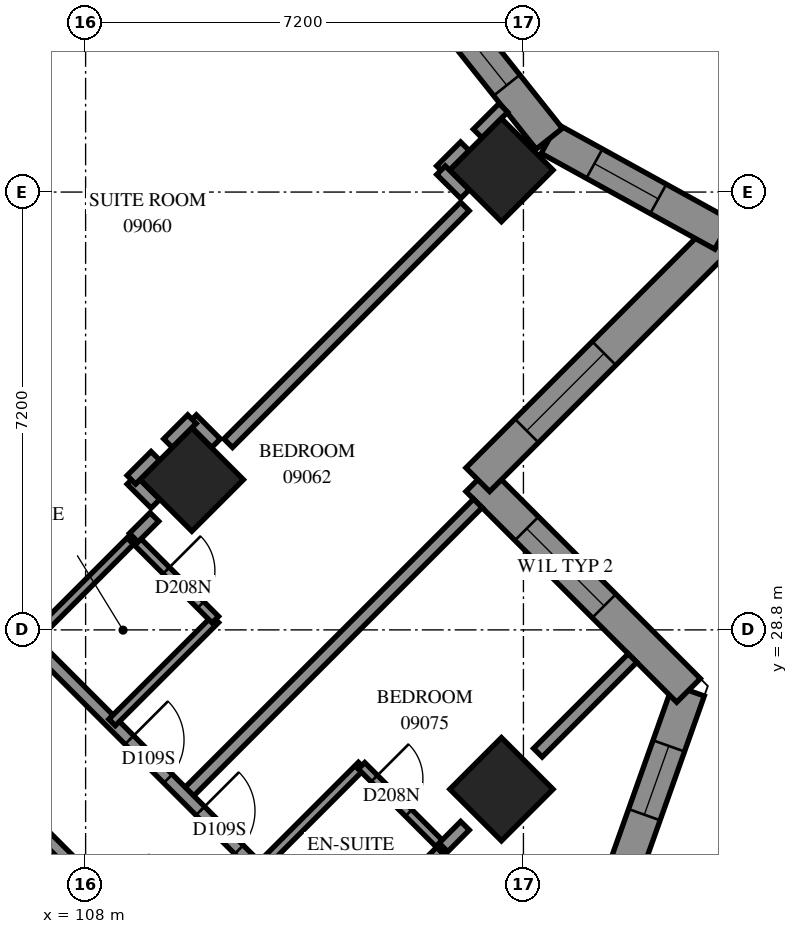
"""IFC4 building model, lengths in metres.
Left out: names, types, materials, properties, quantities, classifications, styles, units other than length and angle.
Written with IfcOpenShell. Run it as: python <this file> out.ifc"""

import sys

from ifc_helpers import new_model, si_unit, direction, frame, frame_2d, origin, origin_2d, place, context, subcontext, project, spatial, polyline, rectangle, outline, extrude, element, fill, save


model = new_model("IFC4")
c1 = context("Model", 3, precision=1e-05, world=origin(), true_north=direction((0.0, 1.0)))
c2 = subcontext(c1, "Body", "Model", "MODEL_VIEW")
j1 = project(units=[si_unit("LENGTHUNIT", "METRE"), si_unit("PLANEANGLEUNIT", "RADIAN")], contexts=[c1])
p1 = place(None, origin())
s1 = spatial("IfcSite", under=j1, at=p1, CompositionType="ELEMENT")
p2 = place(p1, origin())
s2 = spatial("IfcBuilding", under=s1, at=p2, CompositionType="ELEMENT")
p3 = place(p2, frame((0.0, 0.0, 37.2)))
s3 = spatial("IfcBuildingStorey", under=s2, at=p3, CompositionType="ELEMENT", Elevation=37.2)
for number, where, z_axis, x_axis in (
    (1, (114.838, 36.362, 0.0), (0.0, 0.0, 1.0), (0.707, -0.707, 0.0)),
    (2, (109.747, 31.271, 0.0), (0.0, 0.0, 1.0), (0.707, -0.707, 0.0)),
    (3, (114.838, 26.18, 0.0), (0.0, 0.0, 1.0), (0.707, -0.707, 0.0)),
):
    element("IfcColumn", number, at=place(p3, frame(where, z_axis=z_axis, x_axis=x_axis)), inside=s3, PredefinedType="COLUMN", context=c2, shape_type="SweptSolid", body=[
        extrude(rectangle(XDim=1.2, YDim=1.2, at=origin_2d()), origin(), (0.0, 0.0, 1.0), 3.1),
    ])
p4 = place(p3, frame((116.143, 22.82, 0.0), z_axis=(0.0, 0.0, 1.0), x_axis=(0.334975732, 0.9422267556, 0.0)))
e4 = element("IfcWall", 4, at=p4, inside=s3, PredefinedType="SOLIDWALL", context=c2, shape_type="SweptSolid", body=[
    extrude(outline(polyline([(-0.125, -0.275), (5.464, -0.275), (5.117, 0.275), (0.125, 0.275), (-0.125, -0.275)])), origin(), (0.0, 0.0, 1.0), 3.1),
])
p5 = place(p4, frame((0.825, 0.0, 0.5)))
e5 = element("IfcOpeningElement", 5, at=p5, cuts=e4, PredefinedType="OPENING", context=c2, shape_type="SweptSolid", body=[
    extrude(rectangle(XDim=1.2, YDim=2.45, at=frame_2d((0.6, 1.225))), frame((0.0, 0.285, 0.0), z_axis=(0.0, -1.0, 0.0), x_axis=(1.0, 0.0, 0.0)), (0.0, 0.0, 1.0), 0.57),
])
p6 = place(p4, frame((3.121, 0.0, 0.5)))
e6 = element("IfcOpeningElement", 6, at=p6, cuts=e4, PredefinedType="OPENING", context=c2, shape_type="SweptSolid", body=[
    extrude(rectangle(XDim=1.2, YDim=2.45, at=frame_2d((0.6, 1.225))), frame((0.0, 0.285, 0.0), z_axis=(0.0, -1.0, 0.0), x_axis=(1.0, 0.0, 0.0)), (0.0, 0.0, 1.0), 0.57),
])
p7 = place(p3, frame((117.915, 27.805, 0.0), z_axis=(0.0, 0.0, 1.0), x_axis=(-0.7071067812, 0.7071067812, 0.0)))
e7 = element("IfcWall", 7, at=p7, inside=s3, PredefinedType="SOLIDWALL", context=c2, shape_type="SweptSolid", body=[
    extrude(outline(polyline([(-0.174, -0.275), (4.626, -0.275), (5.176, 0.275), (0.174, 0.275), (-0.174, -0.275)])), origin(), (0.0, 0.0, 1.0), 3.1),
])
p8 = place(p7, frame((1.964, 0.0, 0.6)))
e8 = element("IfcOpeningElement", 8, at=p8, cuts=e7, PredefinedType="OPENING", context=c2, shape_type="SweptSolid", body=[
    extrude(rectangle(XDim=1.8, YDim=1.9, at=frame_2d((0.9, 0.95))), frame((0.0, 0.285, 0.0), z_axis=(0.0, -1.0, 0.0), x_axis=(1.0, 0.0, 0.0)), (0.0, 0.0, 1.0), 0.57),
])
p9 = place(p3, frame((114.449, 31.271, 0.0), z_axis=(0.0, 0.0, 1.0), x_axis=(0.7070892384, 0.7071243236, 0.0)))
e9 = element("IfcWall", 9, at=p9, inside=s3, PredefinedType="SOLIDWALL", context=c2, shape_type="SweptSolid", body=[
    extrude(outline(polyline([(0.275, -0.275), (6.066, -0.275), (5.335, 0.275), (-0.275, 0.275), (0.275, -0.275)])), origin(), (0.0, 0.0, 1.0), 3.1),
])
p10 = place(p9, frame((1.137, 0.0, 0.6)))
e10 = element("IfcOpeningElement", 10, at=p10, cuts=e9, PredefinedType="OPENING", context=c2, shape_type="SweptSolid", body=[
    extrude(rectangle(XDim=1.8, YDim=1.9, at=frame_2d((0.9, 0.95))), frame((0.0, 0.285, 0.0), z_axis=(0.0, -1.0, 0.0), x_axis=(1.0, 0.0, 0.0)), (0.0, 0.0, 1.0), 0.57),
])
p11 = place(p3, frame((118.48, 35.301, 0.0), z_axis=(0.0, 0.0, 1.0), x_axis=(-0.8755307205, 0.4831624545, 0.0)))
e11 = element("IfcWall", 11, at=p11, inside=s3, PredefinedType="SOLIDWALL", context=c2, shape_type="SweptSolid", body=[
    extrude(outline(polyline([(-0.366, -0.275), (3.206, -0.275), (3.316, 0.275), (0.366, 0.275), (-0.366, -0.275)])), origin(), (0.0, 0.0, 1.0), 3.1),
])
p12 = place(p11, frame((1.214, 0.0, 0.5)))
e12 = element("IfcOpeningElement", 12, at=p12, cuts=e11, PredefinedType="OPENING", context=c2, shape_type="SweptSolid", body=[
    extrude(rectangle(XDim=1.2, YDim=2.45, at=frame_2d((0.6, 1.225))), frame((0.0, 0.285, 0.0), z_axis=(0.0, -1.0, 0.0), x_axis=(1.0, 0.0, 0.0)), (0.0, 0.0, 1.0), 0.57),
])
p13 = place(p3, frame((115.625, 36.877, 0.0), z_axis=(0.0, 0.0, 1.0), x_axis=(-0.6225043527, 0.782616337, 0.0)))
e13 = element("IfcWall", 13, at=p13, inside=s3, PredefinedType="SOLIDWALL", context=c2, shape_type="SweptSolid", body=[
    extrude(outline(polyline([(0.055, -0.275), (3.509, -0.275), (3.446, 0.275), (-0.055, 0.275), (0.055, -0.275)])), origin(), (0.0, 0.0, 1.0), 3.1),
])
p14 = place(p13, frame((1.123, 0.0, 0.5)))
e14 = element("IfcOpeningElement", 14, at=p14, cuts=e13, PredefinedType="OPENING", context=c2, shape_type="SweptSolid", body=[
    extrude(rectangle(XDim=1.2, YDim=2.45, at=frame_2d((0.6, 1.225))), frame((0.0, 0.285, 0.0), z_axis=(0.0, -1.0, 0.0), x_axis=(1.0, 0.0, 0.0)), (0.0, 0.0, 1.0), 0.57),
])
p15 = place(p3, frame((99.459, 36.255, 0.0), z_axis=(0.0, 0.0, 1.0), x_axis=(0.7071907307, 0.7070228217, 0.0)))
e15 = element("IfcWall", 15, at=p15, inside=s3, PredefinedType="PARTITIONING", context=c2, shape_type="SweptSolid", body=[
    extrude(rectangle(XDim=11.911, YDim=0.2, at=frame_2d((5.956, 0.0))), origin(), (0.0, 0.0, 1.0), 3.1),
])
p16 = place(p3, frame((103.061, 29.677, 0.0), z_axis=(0.0, 0.0, 1.0), x_axis=(0.7071067812, -0.7071067812, 0.0)))
e16 = element("IfcWall", 16, at=p16, inside=s3, PredefinedType="PARTITIONING", context=c2, shape_type="SweptSolid", body=[
    extrude(rectangle(XDim=10.802, YDim=0.2, at=frame_2d((5.401, 0.0))), origin(), (0.0, 0.0, 1.0), 3.1),
])
p17 = place(p16, frame((2.012, 0.0, 0.0)))
e17 = element("IfcOpeningElement", 17, at=p17, cuts=e16, PredefinedType="OPENING", context=c2, shape_type="SweptSolid", body=[
    extrude(rectangle(XDim=0.9, YDim=2.1, at=frame_2d((0.45, 1.05))), frame((0.0, 0.11, 0.0), z_axis=(0.0, -1.0, 0.0), x_axis=(1.0, 0.0, 0.0)), (0.0, 0.0, 1.0), 0.22),
])
p18 = place(p16, frame((7.463, 0.0, 0.0)))
e18 = element("IfcOpeningElement", 18, at=p18, cuts=e16, PredefinedType="OPENING", context=c2, shape_type="SweptSolid", body=[
    extrude(rectangle(XDim=1.0, YDim=2.1, at=frame_2d((0.5, 1.05))), frame((0.0, 0.11, 0.0), z_axis=(0.0, -1.0, 0.0), x_axis=(1.0, 0.0, 0.0)), (0.0, 0.0, 1.0), 0.22),
])
p19 = place(p3, frame((109.64, 26.074, 0.0), z_axis=(0.0, 0.0, 1.0), x_axis=(0.7072538194, 0.7069597124, 0.0)))
e19 = element("IfcWall", 19, at=p19, inside=s3, PredefinedType="PARTITIONING", context=c2, shape_type="SweptSolid", body=[
    extrude(rectangle(XDim=6.8, YDim=0.2, at=frame_2d((3.4, 0.0))), origin(), (0.0, 0.0, 1.0), 3.1),
])
for number, where, z_axis, x_axis in (
    (20, (110.345, 31.871, 0.0), (0.0, 0.0, 1.0), (0.707, 0.707, 0.0)),
    (21, (105.255, 36.963, 0.0), (0.0, 0.0, 1.0), (0.707, 0.707, 0.0)),
):
    element("IfcWall", number, at=place(p3, frame(where, z_axis=z_axis, x_axis=x_axis)), inside=s3, PredefinedType="PARTITIONING", context=c2, shape_type="SweptSolid", body=[
        extrude(rectangle(XDim=5.504, YDim=0.2, at=frame_2d((2.752, 0.0))), origin(), (0.0, 0.0, 1.0), 3.1),
    ])
p20 = place(p3, frame((107.093, 28.615, 0.0), z_axis=(0.0, 0.0, 1.0), x_axis=(0.7072011313, -0.7070124185, 0.0)))
e22 = element("IfcWall", 22, at=p20, inside=s3, PredefinedType="PARTITIONING", context=c2, shape_type="SweptSolid", body=[
    extrude(rectangle(XDim=5.299, YDim=0.2, at=frame_2d((2.65, 0.0))), origin(), (0.0, 0.0, 1.0), 3.1),
])
p21 = place(p20, frame((2.299, 0.0, 0.0)))
e23 = element("IfcOpeningElement", 23, at=p21, cuts=e22, PredefinedType="OPENING", context=c2, shape_type="SweptSolid", body=[
    extrude(rectangle(XDim=0.9, YDim=2.1, at=frame_2d((0.45, 1.05))), frame((0.0, 0.11, 0.0), z_axis=(0.0, -1.0, 0.0), x_axis=(1.0, 0.0, 0.0)), (0.0, 0.0, 1.0), 0.22),
])
p22 = place(p20, frame((3.949, 0.0, 0.0)))
e24 = element("IfcOpeningElement", 24, at=p22, cuts=e22, PredefinedType="OPENING", context=c2, shape_type="SweptSolid", body=[
    extrude(rectangle(XDim=0.9, YDim=2.1, at=frame_2d((0.45, 1.05))), frame((0.0, 0.11, 0.0), z_axis=(0.0, -1.0, 0.0), x_axis=(1.0, 0.0, 0.0)), (0.0, 0.0, 1.0), 0.22),
])
p23 = place(p3, frame((108.435, 27.279, 0.0), z_axis=(0.0, 0.0, 1.0), x_axis=(0.7075233388, 0.706689978, 0.0)))
e25 = element("IfcWall", 25, at=p23, inside=s3, PredefinedType="PARTITIONING", context=c2, shape_type="SweptSolid", body=[
    extrude(rectangle(XDim=2.4, YDim=0.15, at=frame_2d((1.2, 0.0))), origin(), (0.0, 0.0, 1.0), 3.1),
])
p24 = place(p3, frame((112.183, 23.531, 0.0), z_axis=(0.0, 0.0, 1.0), x_axis=(0.7075233388, 0.706689978, 0.0)))
e26 = element("IfcWall", 26, at=p24, inside=s3, PredefinedType="PARTITIONING", context=c2, shape_type="SweptSolid", body=[
    extrude(rectangle(XDim=2.4, YDim=0.15, at=frame_2d((1.2, 0.0))), origin(), (0.0, 0.0, 1.0), 2.6),
])
for number, where, z_axis, x_axis in (
    (27, (107.095, 28.621, 0.0), (0.0, 0.0, 1.0), (0.707, 0.707, 0.0)),
    (28, (110.843, 24.873, 0.0), (0.0, 0.0, 1.0), (0.707, 0.707, 0.0)),
):
    element("IfcWall", number, at=place(p3, frame(where, z_axis=z_axis, x_axis=x_axis)), inside=s3, PredefinedType="PARTITIONING", context=c2, shape_type="SweptSolid", body=[
        extrude(rectangle(XDim=2.398, YDim=0.15, at=frame_2d((1.199, 0.0))), origin(), (0.0, 0.0, 1.0), 3.1),
    ])
p25 = place(p3, frame((115.438, 26.78, 0.0), z_axis=(0.0, 0.0, 1.0), x_axis=(0.7071067812, 0.7071067812, 0.0)))
e29 = element("IfcWall", 29, at=p25, inside=s3, PredefinedType="PARTITIONING", context=c2, shape_type="SweptSolid", body=[
    extrude(rectangle(XDim=2.201, YDim=0.2, at=frame_2d((1.101, 0.0))), origin(), (0.0, 0.0, 1.0), 3.1),
])
p26 = place(p3, frame((108.789, 30.313, 0.0), z_axis=(0.0, 0.0, 1.0), x_axis=(0.7071067812, -0.7071067812, 0.0)))
e30 = element("IfcWall", 30, at=p26, inside=s3, PredefinedType="PARTITIONING", context=c2, shape_type="SweptSolid", body=[
    extrude(rectangle(XDim=1.901, YDim=0.15, at=frame_2d((0.95, 0.0))), origin(), (0.0, 0.0, 1.0), 3.1),
])
p27 = place(p26, frame((0.76, 0.0, 0.0)))
e31 = element("IfcOpeningElement", 31, at=p27, cuts=e30, PredefinedType="OPENING", context=c2, shape_type="SweptSolid", body=[
    extrude(rectangle(XDim=0.8, YDim=2.1, at=frame_2d((0.4, 1.05))), frame((0.0, 0.085, 0.0), z_axis=(0.0, -1.0, 0.0), x_axis=(1.0, 0.0, 0.0)), (0.0, 0.0, 1.0), 0.17),
])
p28 = place(p3, frame((112.537, 26.565, 0.0), z_axis=(0.0, 0.0, 1.0), x_axis=(0.7071067812, -0.7071067812, 0.0)))
e32 = element("IfcWall", 32, at=p28, inside=s3, PredefinedType="PARTITIONING", context=c2, shape_type="SweptSolid", body=[
    extrude(rectangle(XDim=1.901, YDim=0.15, at=frame_2d((0.95, 0.0))), origin(), (0.0, 0.0, 1.0), 3.1),
])
p29 = place(p28, frame((0.297, 0.0, 0.0)))
e33 = element("IfcOpeningElement", 33, at=p29, cuts=e32, PredefinedType="OPENING", context=c2, shape_type="SweptSolid", body=[
    extrude(rectangle(XDim=0.8, YDim=2.1, at=frame_2d((0.4, 1.05))), frame((0.0, 0.085, 0.0), z_axis=(0.0, -1.0, 0.0), x_axis=(1.0, 0.0, 0.0)), (0.0, 0.0, 1.0), 0.17),
])
for number, where, z_axis, x_axis in (
    (34, (113.843, 36.359, 0.0), (0.0, 0.0, 1.0), (0.707, 0.707, 0.0)),
    (35, (108.754, 31.268, 0.0), (0.0, 0.0, 1.0), (0.707, -0.707, 0.0)),
    (36, (109.751, 32.265, 0.0), (0.0, 0.0, 1.0), (0.707, -0.707, 0.0)),
    (37, (109.355, 31.871, 0.0), (0.0, 0.0, 1.0), (0.707, 0.707, 0.0)),
    (38, (108.753, 31.269, 0.0), (0.0, 0.0, 1.0), (0.707, 0.707, 0.0)),
):
    element("IfcWall", number, at=place(p3, frame(where, z_axis=z_axis, x_axis=x_axis)), inside=s3, PredefinedType="PARTITIONING", context=c2, shape_type="SweptSolid", body=[
        extrude(rectangle(XDim=0.557, YDim=0.2, at=frame_2d((0.279, 0.0))), origin(), (0.0, 0.0, 1.0), 3.1),
    ])
p30 = place(p3, frame((113.845, 36.359, 0.0), z_axis=(0.0, 0.0, 1.0), x_axis=(0.7089037401, -0.705305244, 0.0)))
e39 = element("IfcWall", 39, at=p30, inside=s3, PredefinedType="PARTITIONING", context=c2, shape_type="SweptSolid", body=[
    extrude(rectangle(XDim=0.556, YDim=0.2, at=frame_2d((0.278, 0.0))), origin(), (0.0, 0.0, 1.0), 3.1),
])
p31 = place(p3, frame((114.447, 36.963, 0.0), z_axis=(0.0, 0.0, 1.0), x_axis=(0.7071067812, 0.7071067812, 0.0)))
e40 = element("IfcWall", 40, at=p31, inside=s3, PredefinedType="PARTITIONING", context=c2, shape_type="SweptSolid", body=[
    extrude(rectangle(XDim=0.597, YDim=0.2, at=frame_2d((0.298, 0.0))), origin(), (0.0, 0.0, 1.0), 3.1),
])
p32 = place(p3, frame((113.885, 25.223, 0.0), z_axis=(0.0, 0.0, 1.0), x_axis=(0.7051121336, 0.709095818, 0.0)))
e41 = element("IfcWall", 41, at=p32, inside=s3, PredefinedType="PARTITIONING", context=c2, shape_type="SweptSolid", body=[
    extrude(rectangle(XDim=0.502, YDim=0.2, at=frame_2d((0.251, 0.0))), origin(), (0.0, 0.0, 1.0), 2.6),
])
p33 = place(p3, frame((108.791, 30.317, 0.0), z_axis=(0.0, 0.0, 1.0), x_axis=(0.7071067812, 0.7071067812, 0.0)))
e42 = element("IfcWall", 42, at=p33, inside=s3, PredefinedType="PARTITIONING", context=c2, shape_type="SweptSolid", body=[
    extrude(rectangle(XDim=0.481, YDim=0.2, at=frame_2d((0.24, 0.0))), origin(), (0.0, 0.0, 1.0), 3.1),
])
p34 = place(p6, origin())
e43 = element("IfcWindow", 43, at=p34, inside=s3, PartitioningType="SINGLE_PANEL", PredefinedType="WINDOW", context=c2, shape_type="SweptSolid", body=[
    extrude(rectangle(XDim=1.2, YDim=2.45, at=frame_2d((0.6, 1.225))), frame((0.0, 0.155, 0.0), z_axis=(0.0, -1.0, 0.0), x_axis=(1.0, 0.0, 0.0)), (0.0, 0.0, 1.0), 0.06),
])
fill(e6, e43)
p35 = place(p8, origin())
e44 = element("IfcWindow", 44, at=p35, inside=s3, PartitioningType="SINGLE_PANEL", PredefinedType="WINDOW", context=c2, shape_type="SweptSolid", body=[
    extrude(rectangle(XDim=1.8, YDim=1.9, at=frame_2d((0.9, 0.95))), frame((0.0, 0.155, 0.0), z_axis=(0.0, -1.0, 0.0), x_axis=(1.0, 0.0, 0.0)), (0.0, 0.0, 1.0), 0.06),
])
fill(e8, e44)
p36 = place(p10, origin())
e45 = element("IfcWindow", 45, at=p36, inside=s3, PartitioningType="SINGLE_PANEL", PredefinedType="WINDOW", context=c2, shape_type="SweptSolid", body=[
    extrude(rectangle(XDim=1.8, YDim=1.9, at=frame_2d((0.9, 0.95))), frame((0.0, 0.155, 0.0), z_axis=(0.0, -1.0, 0.0), x_axis=(1.0, 0.0, 0.0)), (0.0, 0.0, 1.0), 0.06),
])
fill(e10, e45)
p37 = place(p12, origin())
e46 = element("IfcWindow", 46, at=p37, inside=s3, PartitioningType="SINGLE_PANEL", PredefinedType="WINDOW", context=c2, shape_type="SweptSolid", body=[
    extrude(rectangle(XDim=1.2, YDim=2.45, at=frame_2d((0.6, 1.225))), frame((0.0, 0.155, 0.0), z_axis=(0.0, -1.0, 0.0), x_axis=(1.0, 0.0, 0.0)), (0.0, 0.0, 1.0), 0.06),
])
fill(e12, e46)
p38 = place(p14, origin())
e47 = element("IfcWindow", 47, at=p38, inside=s3, PartitioningType="SINGLE_PANEL", PredefinedType="WINDOW", context=c2, shape_type="SweptSolid", body=[
    extrude(rectangle(XDim=1.2, YDim=2.45, at=frame_2d((0.6, 1.225))), frame((0.0, 0.155, 0.0), z_axis=(0.0, -1.0, 0.0), x_axis=(1.0, 0.0, 0.0)), (0.0, 0.0, 1.0), 0.06),
])
fill(e14, e47)
p39 = place(p21, origin())
e48 = element("IfcDoor", 48, at=p39, inside=s3, OperationType="SINGLE_SWING_LEFT", PredefinedType="DOOR", context=c2, shape_type="SweptSolid", body=[
    extrude(rectangle(XDim=0.9, YDim=2.1, at=frame_2d((0.45, 1.05))), frame((0.0, 0.025, 0.0), z_axis=(0.0, -1.0, 0.0), x_axis=(1.0, 0.0, 0.0)), (0.0, 0.0, 1.0), 0.05),
])
fill(e23, e48)
p40 = place(p27, origin())
e49 = element("IfcDoor", 49, at=p40, inside=s3, OperationType="SINGLE_SWING_RIGHT", PredefinedType="DOOR", context=c2, shape_type="SweptSolid", body=[
    extrude(rectangle(XDim=0.8, YDim=2.1, at=frame_2d((0.4, 1.05))), frame((0.0, 0.025, 0.0), z_axis=(0.0, -1.0, 0.0), x_axis=(1.0, 0.0, 0.0)), (0.0, 0.0, 1.0), 0.05),
])
fill(e31, e49)
p41 = place(p22, origin())
e50 = element("IfcDoor", 50, at=p41, inside=s3, OperationType="SINGLE_SWING_RIGHT", PredefinedType="DOOR", context=c2, shape_type="SweptSolid", body=[
    extrude(rectangle(XDim=0.9, YDim=2.1, at=frame_2d((0.45, 1.05))), frame((0.0, 0.025, 0.0), z_axis=(0.0, -1.0, 0.0), x_axis=(1.0, 0.0, 0.0)), (0.0, 0.0, 1.0), 0.05),
])
fill(e24, e50)
p42 = place(p29, origin())
e51 = element("IfcDoor", 51, at=p42, inside=s3, OperationType="SINGLE_SWING_RIGHT", PredefinedType="DOOR", context=c2, shape_type="SweptSolid", body=[
    extrude(rectangle(XDim=0.8, YDim=2.1, at=frame_2d((0.4, 1.05))), frame((0.0, 0.025, 0.0), z_axis=(0.0, -1.0, 0.0), x_axis=(1.0, 0.0, 0.0)), (0.0, 0.0, 1.0), 0.05),
])
fill(e33, e51)
save(model, sys.argv[1])
